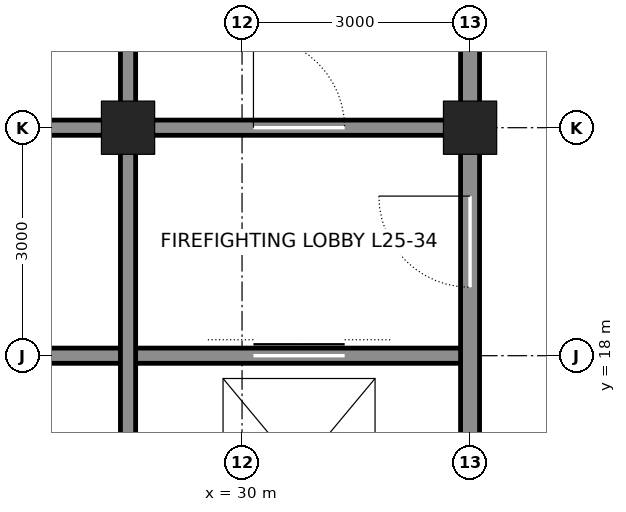
"""IFC4 building model, lengths in metres.
Left out: names, types, materials, properties, quantities, classifications, styles, units other than length and angle.
Written with IfcOpenShell. Run it as: python <this file> out.ifc"""

import sys

from ifc_helpers import new_model, si_unit, direction, frame, frame_2d, origin, origin_2d, place, context, subcontext, project, spatial, rectangle, hollow_rectangle, extrude, element, fill, save


model = new_model("IFC4")
c1 = context("Model", 3, precision=1e-05, world=origin(), true_north=direction((0.0, 1.0)))
c2 = subcontext(c1, "Body", "Model", "MODEL_VIEW")
j1 = project(units=[si_unit("LENGTHUNIT", "METRE"), si_unit("PLANEANGLEUNIT", "RADIAN")], contexts=[c1])
p1 = place(None, origin())
s1 = spatial("IfcSite", under=j1, at=p1, CompositionType="ELEMENT")
p2 = place(p1, origin())
s2 = spatial("IfcBuilding", under=s1, at=p2, CompositionType="ELEMENT")
p3 = place(p2, frame((0.0, 0.0, 119.4)))
s3 = spatial("IfcBuildingStorey", under=s2, at=p3, CompositionType="ELEMENT", Elevation=119.4)
for number, where, z_axis, x_axis in (
    (1, (33.0, 21.0, 0.0), (0.0, 0.0, 1.0), (1.0, 0.0, 0.0)),
    (2, (28.5, 21.0, 0.0), (0.0, 0.0, 1.0), (1.0, 0.0, 0.0)),
):
    element("IfcColumn", number, at=place(p3, frame(where, z_axis=z_axis, x_axis=x_axis)), inside=s3, PredefinedType="COLUMN", context=c2, shape_type="SweptSolid", body=[
        extrude(hollow_rectangle(XDim=0.7, YDim=0.7, WallThickness=0.07, at=origin_2d()), origin(), (0.0, 0.0, 1.0), 4.2),
    ])
p4 = place(p3, frame((25.5, 18.0, 0.0), z_axis=(0.0, 0.0, 1.0), x_axis=(1.0, 0.0, 0.0)))
e3 = element("IfcWall", 3, at=p4, inside=s3, PredefinedType="SOLIDWALL", context=c2, shape_type="SweptSolid", body=[
    extrude(rectangle(XDim=7.5, YDim=0.2, at=frame_2d((3.75, 0.0))), origin(), (0.0, 0.0, 1.0), 4.04),
])
p5 = place(p4, frame((4.65, 0.0, 0.0)))
e4 = element("IfcOpeningElement", 4, at=p5, cuts=e3, PredefinedType="OPENING", context=c2, shape_type="SweptSolid", body=[
    extrude(rectangle(XDim=1.2, YDim=2.1, at=frame_2d((0.6, 1.05))), frame((0.0, 0.11, 0.0), z_axis=(0.0, -1.0, 0.0), x_axis=(1.0, 0.0, 0.0)), (0.0, 0.0, 1.0), 0.22),
])
p6 = place(p3, frame((25.5, 21.0, 0.0), z_axis=(0.0, 0.0, 1.0), x_axis=(1.0, 0.0, 0.0)))
e5 = element("IfcWall", 5, at=p6, inside=s3, PredefinedType="SOLIDWALL", context=c2, shape_type="SweptSolid", body=[
    extrude(rectangle(XDim=2.75, YDim=0.2, at=frame_2d((1.375, 0.0))), origin(), (0.0, 0.0, 1.0), 3.09),
])
p7 = place(p3, frame((28.75, 21.0, 0.0), z_axis=(0.0, 0.0, 1.0), x_axis=(1.0, 0.0, 0.0)))
e6 = element("IfcWall", 6, at=p7, inside=s3, PredefinedType="SOLIDWALL", context=c2, shape_type="SweptSolid", body=[
    extrude(rectangle(XDim=4.0, YDim=0.2, at=frame_2d((2.0, 0.0))), origin(), (0.0, 0.0, 1.0), 3.09),
])
p8 = place(p7, frame((1.4, 0.0, 0.0)))
e7 = element("IfcOpeningElement", 7, at=p8, cuts=e6, PredefinedType="OPENING", context=c2, shape_type="SweptSolid", body=[
    extrude(rectangle(XDim=1.2, YDim=2.1, at=frame_2d((0.6, 1.05))), frame((0.0, 0.11, 0.0), z_axis=(0.0, -1.0, 0.0), x_axis=(1.0, 0.0, 0.0)), (0.0, 0.0, 1.0), 0.22),
])
p9 = place(p3, frame((28.5, 12.25, 0.0), z_axis=(0.0, 0.0, 1.0), x_axis=(0.0, 1.0, 0.0)))
e8 = element("IfcWall", 8, at=p9, inside=s3, PredefinedType="SOLIDWALL", context=c2, shape_type="SweptSolid", body=[
    extrude(rectangle(XDim=8.5, YDim=0.2, at=frame_2d((4.25, 0.0))), origin(), (0.0, 0.0, 1.0), 3.113),
])
p10 = place(p3, frame((28.5, 21.25, 0.0), z_axis=(0.0, 0.0, 1.0), x_axis=(0.0, 1.0, 0.0)))
e9 = element("IfcWall", 9, at=p10, inside=s3, PredefinedType="SOLIDWALL", context=c2, shape_type="SweptSolid", body=[
    extrude(rectangle(XDim=2.5, YDim=0.2, at=frame_2d((1.25, 0.0))), origin(), (0.0, 0.0, 1.0), 3.113),
])
p11 = place(p3, frame((33.0, 12.25, 0.0), z_axis=(0.0, 0.0, 1.0), x_axis=(0.0, 1.0, 0.0)))
e10 = element("IfcWall", 10, at=p11, inside=s3, PredefinedType="SOLIDWALL", context=c2, shape_type="SweptSolid", body=[
    extrude(rectangle(XDim=8.5, YDim=0.25, at=frame_2d((4.25, 0.0))), origin(), (0.0, 0.0, 1.0), 3.113),
])
p12 = place(p11, frame((6.65, 0.0, 0.0)))
e11 = element("IfcOpeningElement", 11, at=p12, cuts=e10, PredefinedType="OPENING", context=c2, shape_type="SweptSolid", body=[
    extrude(rectangle(XDim=1.2, YDim=2.1, at=frame_2d((0.6, 1.05))), frame((0.0, 0.135, 0.0), z_axis=(0.0, -1.0, 0.0), x_axis=(1.0, 0.0, 0.0)), (0.0, 0.0, 1.0), 0.27),
])
p13 = place(p11, frame((0.875, 0.0, 0.0)))
e12 = element("IfcOpeningElement", 12, at=p13, cuts=e10, PredefinedType="OPENING", context=c2, shape_type="SweptSolid", body=[
    extrude(rectangle(XDim=0.75, YDim=2.1, at=frame_2d((0.375, 1.05))), frame((0.0, 0.135, 0.0), z_axis=(0.0, -1.0, 0.0), x_axis=(1.0, 0.0, 0.0)), (0.0, 0.0, 1.0), 0.27),
])
p14 = place(p3, frame((33.0, 21.25, 0.0), z_axis=(0.0, 0.0, 1.0), x_axis=(0.0, 1.0, 0.0)))
e13 = element("IfcWall", 13, at=p14, inside=s3, PredefinedType="SOLIDWALL", context=c2, shape_type="SweptSolid", body=[
    extrude(rectangle(XDim=2.5, YDim=0.25, at=frame_2d((1.25, 0.0))), origin(), (0.0, 0.0, 1.0), 3.113),
])
p15 = place(p8, origin())
e14 = element("IfcDoor", 14, at=p15, inside=s3, OperationType="SINGLE_SWING_LEFT", PredefinedType="DOOR", context=c2, shape_type="SweptSolid", body=[
    extrude(rectangle(XDim=1.2, YDim=2.1, at=frame_2d((0.6, 1.05))), frame((0.0, 0.025, 0.0), z_axis=(0.0, -1.0, 0.0), x_axis=(1.0, 0.0, 0.0)), (0.0, 0.0, 1.0), 0.05),
])
fill(e7, e14)
p16 = place(p12, origin())
e15 = element("IfcDoor", 15, at=p16, inside=s3, OperationType="SINGLE_SWING_RIGHT", PredefinedType="DOOR", context=c2, shape_type="SweptSolid", body=[
    extrude(rectangle(XDim=1.2, YDim=2.1, at=frame_2d((0.6, 1.05))), frame((0.0, 0.025, 0.0), z_axis=(0.0, -1.0, 0.0), x_axis=(1.0, 0.0, 0.0)), (0.0, 0.0, 1.0), 0.05),
])
fill(e11, e15)
p17 = place(p5, origin())
e16 = element("IfcDoor", 16, at=p17, inside=s3, OperationType="DOUBLE_DOOR_SLIDING", PredefinedType="DOOR", context=c2, shape_type="SweptSolid", body=[
    extrude(rectangle(XDim=1.2, YDim=2.1, at=frame_2d((0.6, 1.05))), frame((0.0, 0.025, 0.0), z_axis=(0.0, -1.0, 0.0), x_axis=(1.0, 0.0, 0.0)), (0.0, 0.0, 1.0), 0.05),
])
fill(e4, e16)
save(model, sys.argv[1])
